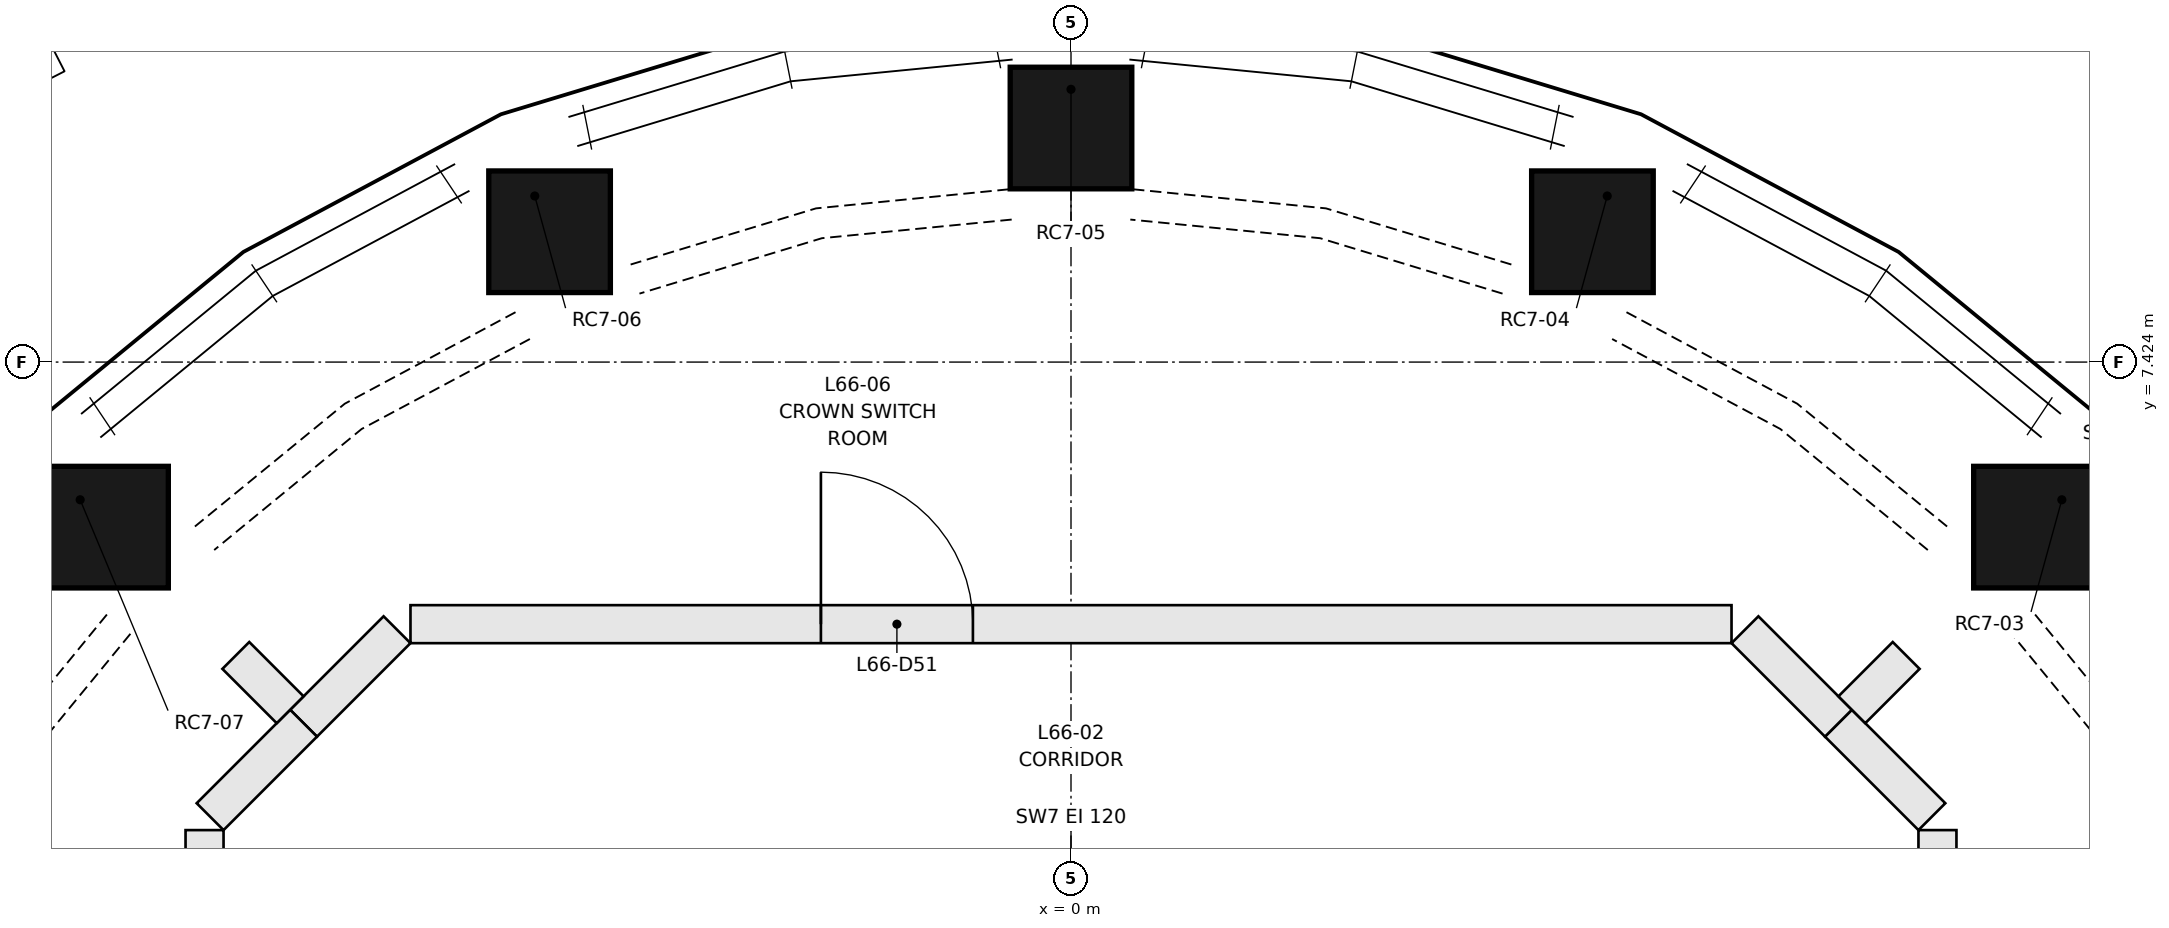
"""IFC4 building model, lengths in metres.
Left out: names, types, materials, properties, quantities, classifications, styles, units other than length and angle.
Written with IfcOpenShell. Run it as: python <this file> out.ifc"""

import sys

from ifc_helpers import new_model, si_unit, direction, frame, frame_2d, origin, origin_2d, place, context, subcontext, project, spatial, rectangle, extrude, element, fill, save


model = new_model("IFC4")
c1 = context("Model", 3, precision=1e-05, world=origin(), true_north=direction((0.0, 1.0)))
c2 = subcontext(c1, "Body", "Model", "MODEL_VIEW")
j1 = project(units=[si_unit("LENGTHUNIT", "METRE"), si_unit("PLANEANGLEUNIT", "RADIAN")], contexts=[c1])
p1 = place(None, origin())
s1 = spatial("IfcSite", under=j1, at=p1, CompositionType="ELEMENT")
p2 = place(p1, origin())
s2 = spatial("IfcBuilding", under=s1, at=p2, CompositionType="ELEMENT")
p3 = place(p2, frame((0.0, 0.0, 244.4)))
s3 = spatial("IfcBuildingStorey", under=s2, at=p3, CompositionType="ELEMENT", Elevation=244.4)
p4 = place(p3, frame((6.518, 6.518, 0.5), z_axis=(0.0, 0.0, 1.0), x_axis=(0.707106781187, -0.707106781187, 0.0)))
e1 = element("IfcColumn", 1, at=p4, inside=s3, PredefinedType="COLUMN", context=c2, shape_type="SweptSolid", body=[
    extrude(rectangle(XDim=0.8, YDim=0.8, at=origin_2d()), origin(), (0.0, -0.342, 0.94), 2.979),
])
p5 = place(p3, frame((3.528, 8.517, 0.5), z_axis=(0.0, 0.0, 1.0), x_axis=(0.923876553121, -0.38269062517, 0.0)))
e2 = element("IfcColumn", 2, at=p5, inside=s3, PredefinedType="COLUMN", context=c2, shape_type="SweptSolid", body=[
    extrude(rectangle(XDim=0.8, YDim=0.8, at=origin_2d()), origin(), (0.0, -0.342, 0.94), 2.979),
])
p6 = place(p3, frame((0.0, 9.218, 0.5), z_axis=(0.0, 0.0, 1.0), x_axis=(1.0, 0.0, 0.0)))
e3 = element("IfcColumn", 3, at=p6, inside=s3, PredefinedType="COLUMN", context=c2, shape_type="SweptSolid", body=[
    extrude(rectangle(XDim=0.8, YDim=0.8, at=origin_2d()), origin(), (0.0, -0.342, 0.94), 2.979),
])
p7 = place(p3, frame((-3.528, 8.517, 0.5), z_axis=(0.0, 0.0, 1.0), x_axis=(0.923876553121, 0.38269062517, 0.0)))
e4 = element("IfcColumn", 4, at=p7, inside=s3, PredefinedType="COLUMN", context=c2, shape_type="SweptSolid", body=[
    extrude(rectangle(XDim=0.8, YDim=0.8, at=origin_2d()), origin(), (0.0, -0.342, 0.94), 2.979),
])
p8 = place(p3, frame((-6.518, 6.518, 0.5), z_axis=(0.0, 0.0, 1.0), x_axis=(0.707106781187, 0.707106781187, 0.0)))
e5 = element("IfcColumn", 5, at=p8, inside=s3, PredefinedType="COLUMN", context=c2, shape_type="SweptSolid", body=[
    extrude(rectangle(XDim=0.8, YDim=0.8, at=origin_2d()), origin(), (0.0, -0.342, 0.94), 2.979),
])
p9 = place(p3, frame((5.049, 5.049, 0.0), z_axis=(0.0, 0.0, 1.0), x_axis=(0.706966384729, -0.707247149774, 0.0)))
e6 = element("IfcWall", 6, at=p9, inside=s3, PredefinedType="PARTITIONING", context=c2, shape_type="SweptSolid", body=[
    extrude(rectangle(XDim=0.87, YDim=0.25, at=frame_2d((0.435, 0.0))), origin(), (0.0, 0.0, 1.0), 2.95),
])
p10 = place(p3, frame((5.7, 4.345, 0.0), z_axis=(0.0, 0.0, 1.0), x_axis=(0.0, -1.0, 0.0)))
e7 = element("IfcWall", 7, at=p10, inside=s3, PredefinedType="PARTITIONING", context=c2, shape_type="SweptSolid", body=[
    extrude(rectangle(XDim=8.69, YDim=0.25, at=frame_2d((4.345, 0.0))), origin(), (0.0, 0.0, 1.0), 2.95),
])
p11 = place(p10, frame((2.7, 0.0, 0.0)))
e8 = element("IfcOpeningElement", 8, at=p11, cuts=e7, PredefinedType="OPENING", context=c2, shape_type="SweptSolid", body=[
    extrude(rectangle(XDim=1.0, YDim=2.1, at=frame_2d((0.5, 1.05))), frame((0.0, 0.135, 0.0), z_axis=(0.0, -1.0, 0.0), x_axis=(1.0, 0.0, 0.0)), (0.0, 0.0, 1.0), 0.27),
])
p12 = place(p3, frame((-5.049, 5.049, 0.0), z_axis=(0.0, 0.0, 1.0), x_axis=(0.707247149774, 0.706966384729, 0.0)))
e9 = element("IfcWall", 9, at=p12, inside=s3, PredefinedType="PARTITIONING", context=c2, shape_type="SweptSolid", body=[
    extrude(rectangle(XDim=0.87, YDim=0.25, at=frame_2d((0.435, 0.0))), origin(), (0.0, 0.0, 1.0), 2.95),
])
p13 = place(p3, frame((-4.345, 5.7, 0.0), z_axis=(0.0, 0.0, 1.0), x_axis=(1.0, 0.0, 0.0)))
e10 = element("IfcWall", 10, at=p13, inside=s3, PredefinedType="PARTITIONING", context=c2, shape_type="SweptSolid", body=[
    extrude(rectangle(XDim=8.69, YDim=0.25, at=frame_2d((4.345, 0.0))), origin(), (0.0, 0.0, 1.0), 2.95),
])
p14 = place(p13, frame((2.7, 0.0, 0.0)))
e11 = element("IfcOpeningElement", 11, at=p14, cuts=e10, PredefinedType="OPENING", context=c2, shape_type="SweptSolid", body=[
    extrude(rectangle(XDim=1.0, YDim=2.1, at=frame_2d((0.5, 1.05))), frame((0.0, 0.135, 0.0), z_axis=(0.0, -1.0, 0.0), x_axis=(1.0, 0.0, 0.0)), (0.0, 0.0, 1.0), 0.27),
])
p15 = place(p3, frame((4.434, 5.663, 0.0), z_axis=(0.0, 0.0, 1.0), x_axis=(0.707247149774, -0.706966384729, 0.0)))
e12 = element("IfcWall", 12, at=p15, inside=s3, PredefinedType="PARTITIONING", context=c2, shape_type="SweptSolid", body=[
    extrude(rectangle(XDim=0.87, YDim=0.25, at=frame_2d((0.435, 0.0))), origin(), (0.0, 0.0, 1.0), 2.95),
])
p16 = place(p3, frame((-5.7, -4.345, 0.0), z_axis=(0.0, 0.0, 1.0), x_axis=(0.0, 1.0, 0.0)))
e13 = element("IfcWall", 13, at=p16, inside=s3, PredefinedType="PARTITIONING", context=c2, shape_type="SweptSolid", body=[
    extrude(rectangle(XDim=8.69, YDim=0.25, at=frame_2d((4.345, 0.0))), origin(), (0.0, 0.0, 1.0), 2.95),
])
p17 = place(p16, frame((2.7, 0.0, 0.0)))
e14 = element("IfcOpeningElement", 14, at=p17, cuts=e13, PredefinedType="OPENING", context=c2, shape_type="SweptSolid", body=[
    extrude(rectangle(XDim=1.0, YDim=2.1, at=frame_2d((0.5, 1.05))), frame((0.0, 0.135, 0.0), z_axis=(0.0, -1.0, 0.0), x_axis=(1.0, 0.0, 0.0)), (0.0, 0.0, 1.0), 0.27),
])
p18 = place(p3, frame((-5.663, 4.434, 0.0), z_axis=(0.0, 0.0, 1.0), x_axis=(0.706966384729, 0.707247149774, 0.0)))
e15 = element("IfcWall", 15, at=p18, inside=s3, PredefinedType="PARTITIONING", context=c2, shape_type="SweptSolid", body=[
    extrude(rectangle(XDim=0.87, YDim=0.25, at=frame_2d((0.435, 0.0))), origin(), (0.0, 0.0, 1.0), 2.95),
])
for number, where, z_axis, x_axis in (
    (16, (5.137, 5.137, 0.0), (0.0, 0.0, 1.0), (0.707, 0.707, 0.0)),
    (17, (-5.137, 5.137, 0.0), (0.0, 0.0, 1.0), (-0.707, 0.707, 0.0)),
):
    element("IfcWall", number, at=place(p3, frame(where, z_axis=z_axis, x_axis=x_axis)), inside=s3, PredefinedType="PARTITIONING", context=c2, shape_type="SweptSolid", body=[
        extrude(rectangle(XDim=0.505, YDim=0.25, at=frame_2d((0.252, 0.0))), origin(), (0.0, 0.0, 1.0), 2.95),
    ])
p19 = place(p14, origin())
e18 = element("IfcDoor", 18, at=p19, inside=s3, OperationType="SINGLE_SWING_LEFT", PredefinedType="DOOR", context=c2, shape_type="SweptSolid", body=[
    extrude(rectangle(XDim=1.0, YDim=2.1, at=frame_2d((0.5, 1.05))), frame((0.0, 0.025, 0.0), z_axis=(0.0, -1.0, 0.0), x_axis=(1.0, 0.0, 0.0)), (0.0, 0.0, 1.0), 0.05),
])
fill(e11, e18)
save(model, sys.argv[1])
